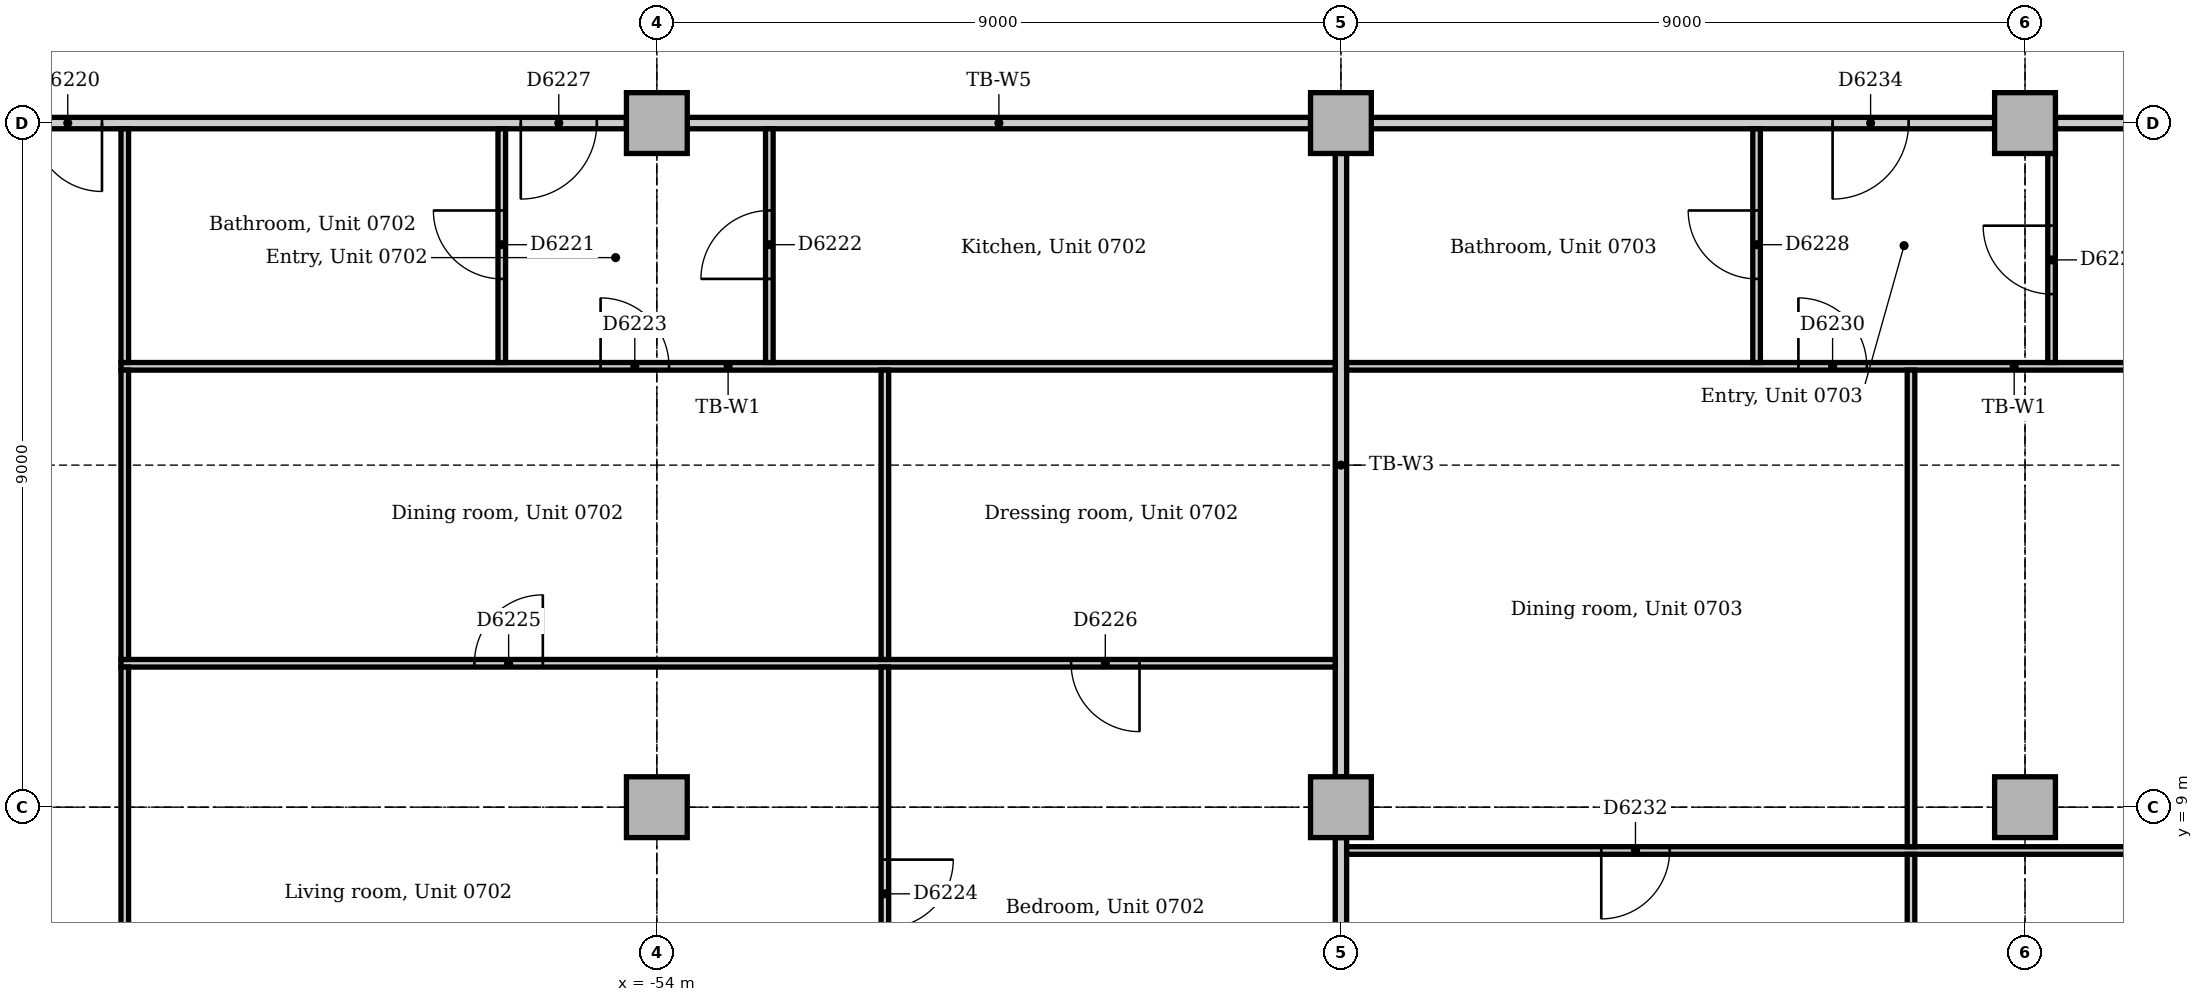
"""IFC4 building model, lengths in metres.
Left out: names, types, materials, properties, quantities, classifications, styles, units other than length and angle.
Written with IfcOpenShell. Run it as: python <this file> out.ifc"""

import sys

from ifc_helpers import new_model, si_unit, direction, frame, frame_2d, origin, origin_2d, place, context, subcontext, project, spatial, rectangle, extrude, element, fill, save


model = new_model("IFC4")
c1 = context("Model", 3, precision=1e-05, world=origin(), true_north=direction((0.0, 1.0)))
c2 = subcontext(c1, "Body", "Model", "MODEL_VIEW")
j1 = project(units=[si_unit("LENGTHUNIT", "METRE"), si_unit("PLANEANGLEUNIT", "RADIAN")], contexts=[c1])
p1 = place(None, origin())
s1 = spatial("IfcSite", under=j1, at=p1, CompositionType="ELEMENT")
p2 = place(p1, origin())
s2 = spatial("IfcBuilding", under=s1, at=p2, CompositionType="ELEMENT")
p3 = place(p2, frame((0.0, 0.0, 34.0)))
s3 = spatial("IfcBuildingStorey", under=s2, at=p3, CompositionType="ELEMENT", Elevation=34.0)
for number, where, z_axis, x_axis in (
    (1, (-54.0, 9.0, 0.0), (0.0, 0.0, 1.0), (1.0, 0.0, 0.0)),
    (2, (-54.0, 18.0, 0.0), (0.0, 0.0, 1.0), (1.0, 0.0, 0.0)),
    (3, (-45.0, 9.0, 0.0), (0.0, 0.0, 1.0), (1.0, 0.0, 0.0)),
    (4, (-45.0, 18.0, 0.0), (0.0, 0.0, 1.0), (1.0, 0.0, 0.0)),
    (5, (-36.0, 9.0, 0.0), (0.0, 0.0, 1.0), (1.0, 0.0, 0.0)),
    (6, (-36.0, 18.0, 0.0), (0.0, 0.0, 1.0), (1.0, 0.0, 0.0)),
):
    element("IfcColumn", number, at=place(p3, frame(where, z_axis=z_axis, x_axis=x_axis)), inside=s3, PredefinedType="COLUMN", context=c2, shape_type="SweptSolid", body=[
        extrude(rectangle(XDim=0.8, YDim=0.8, at=origin_2d()), origin(), (0.0, 0.0, 1.0), 3.85),
    ])
p4 = place(p3, frame((-35.6, 18.0, 0.0), z_axis=(0.0, 0.0, 1.0), x_axis=(1.0, 0.0, 0.0)))
e7 = element("IfcWall", 7, at=p4, inside=s3, PredefinedType="PARTITIONING", context=c2, shape_type="SweptSolid", body=[
    extrude(rectangle(XDim=7.25, YDim=0.15, at=frame_2d((3.625, 0.0))), origin(), (0.0, 0.0, 1.0), 3.15),
])
p5 = place(p3, frame((-44.6, 18.0, 0.0), z_axis=(0.0, 0.0, 1.0), x_axis=(1.0, 0.0, 0.0)))
e8 = element("IfcWall", 8, at=p5, inside=s3, PredefinedType="PARTITIONING", context=c2, shape_type="SweptSolid", body=[
    extrude(rectangle(XDim=8.2, YDim=0.15, at=frame_2d((4.1, 0.0))), origin(), (0.0, 0.0, 1.0), 3.15),
])
p6 = place(p5, frame((6.068, 0.0, 0.0)))
e9 = element("IfcOpeningElement", 9, at=p6, cuts=e8, PredefinedType="OPENING", context=c2, shape_type="SweptSolid", body=[
    extrude(rectangle(XDim=1.0, YDim=2.1, at=frame_2d((0.5, 1.05))), frame((0.0, 0.085, 0.0), z_axis=(0.0, -1.0, 0.0), x_axis=(1.0, 0.0, 0.0)), (0.0, 0.0, 1.0), 0.17),
])
p7 = place(p3, frame((-53.6, 18.0, 0.0), z_axis=(0.0, 0.0, 1.0), x_axis=(1.0, 0.0, 0.0)))
e10 = element("IfcWall", 10, at=p7, inside=s3, PredefinedType="PARTITIONING", context=c2, shape_type="SweptSolid", body=[
    extrude(rectangle(XDim=8.2, YDim=0.15, at=frame_2d((4.1, 0.0))), origin(), (0.0, 0.0, 1.0), 3.15),
])
p8 = place(p3, frame((-62.6, 18.0, 0.0), z_axis=(0.0, 0.0, 1.0), x_axis=(1.0, 0.0, 0.0)))
e11 = element("IfcWall", 11, at=p8, inside=s3, PredefinedType="PARTITIONING", context=c2, shape_type="SweptSolid", body=[
    extrude(rectangle(XDim=8.2, YDim=0.15, at=frame_2d((4.1, 0.0))), origin(), (0.0, 0.0, 1.0), 3.15),
])
p9 = place(p8, frame((0.4, 0.0, 0.0)))
e12 = element("IfcOpeningElement", 12, at=p9, cuts=e11, PredefinedType="OPENING", context=c2, shape_type="SweptSolid", body=[
    extrude(rectangle(XDim=0.9, YDim=2.1, at=frame_2d((0.45, 1.05))), frame((0.0, 0.085, 0.0), z_axis=(0.0, -1.0, 0.0), x_axis=(1.0, 0.0, 0.0)), (0.0, 0.0, 1.0), 0.17),
])
p10 = place(p8, frame((6.81, 0.0, 0.0)))
e13 = element("IfcOpeningElement", 13, at=p10, cuts=e11, PredefinedType="OPENING", context=c2, shape_type="SweptSolid", body=[
    extrude(rectangle(XDim=1.0, YDim=2.1, at=frame_2d((0.5, 1.05))), frame((0.0, 0.085, 0.0), z_axis=(0.0, -1.0, 0.0), x_axis=(1.0, 0.0, 0.0)), (0.0, 0.0, 1.0), 0.17),
])
p11 = place(p3, frame((-45.0, 9.4, 0.0), z_axis=(0.0, 0.0, 1.0), x_axis=(0.0, 1.0, 0.0)))
e14 = element("IfcWall", 14, at=p11, inside=s3, PredefinedType="PARTITIONING", context=c2, shape_type="SweptSolid", body=[
    extrude(rectangle(XDim=8.2, YDim=0.15, at=frame_2d((4.1, 0.0))), origin(), (0.0, 0.0, 1.0), 3.158),
])
p12 = place(p3, frame((-45.0, 5.85, 0.0), z_axis=(0.0, 0.0, 1.0), x_axis=(0.0, 1.0, 0.0)))
e15 = element("IfcWall", 15, at=p12, inside=s3, PredefinedType="PARTITIONING", context=c2, shape_type="SweptSolid", body=[
    extrude(rectangle(XDim=2.75, YDim=0.15, at=frame_2d((1.375, 0.0))), origin(), (0.0, 0.0, 1.0), 3.652),
])
p13 = place(p3, frame((-61.05, 14.8, 0.0), z_axis=(0.0, 0.0, 1.0), x_axis=(1.0, 0.0, 0.0)))
e16 = element("IfcWall", 16, at=p13, inside=s3, PredefinedType="PARTITIONING", context=c2, shape_type="SweptSolid", body=[
    extrude(rectangle(XDim=15.975, YDim=0.1, at=frame_2d((7.987, 0.0))), origin(), (0.0, 0.0, 1.0), 3.85),
])
p14 = place(p13, frame((6.31, 0.0, 0.0)))
e17 = element("IfcOpeningElement", 17, at=p14, cuts=e16, PredefinedType="OPENING", context=c2, shape_type="SweptSolid", body=[
    extrude(rectangle(XDim=0.9, YDim=2.1, at=frame_2d((0.45, 1.05))), frame((0.0, 0.06, 0.0), z_axis=(0.0, -1.0, 0.0), x_axis=(1.0, 0.0, 0.0)), (0.0, 0.0, 1.0), 0.12),
])
p15 = place(p3, frame((-44.925, 14.8, 0.0), z_axis=(0.0, 0.0, 1.0), x_axis=(1.0, 0.0, 0.0)))
e18 = element("IfcWall", 18, at=p15, inside=s3, PredefinedType="PARTITIONING", context=c2, shape_type="SweptSolid", body=[
    extrude(rectangle(XDim=17.565, YDim=0.1, at=frame_2d((8.783, 0.0))), origin(), (0.0, 0.0, 1.0), 3.85),
])
p16 = place(p15, frame((5.943, 0.0, 0.0)))
e19 = element("IfcOpeningElement", 19, at=p16, cuts=e18, PredefinedType="OPENING", context=c2, shape_type="SweptSolid", body=[
    extrude(rectangle(XDim=0.9, YDim=2.1, at=frame_2d((0.45, 1.05))), frame((0.0, 0.06, 0.0), z_axis=(0.0, -1.0, 0.0), x_axis=(1.0, 0.0, 0.0)), (0.0, 0.0, 1.0), 0.12),
])
p17 = place(p3, frame((-44.925, 8.43, 0.0), z_axis=(0.0, 0.0, 1.0), x_axis=(1.0, 0.0, 0.0)))
e20 = element("IfcWall", 20, at=p17, inside=s3, PredefinedType="PARTITIONING", context=c2, shape_type="SweptSolid", body=[
    extrude(rectangle(XDim=15.922, YDim=0.1, at=frame_2d((7.961, 0.0))), origin(), (0.0, 0.0, 1.0), 3.85),
])
p18 = place(p17, frame((3.35, 0.0, 0.0)))
e21 = element("IfcOpeningElement", 21, at=p18, cuts=e20, PredefinedType="OPENING", context=c2, shape_type="SweptSolid", body=[
    extrude(rectangle(XDim=0.9, YDim=2.1, at=frame_2d((0.45, 1.05))), frame((0.0, 0.06, 0.0), z_axis=(0.0, -1.0, 0.0), x_axis=(1.0, 0.0, 0.0)), (0.0, 0.0, 1.0), 0.12),
])
p19 = place(p17, frame((11.125, 0.0, 0.0)))
e22 = element("IfcOpeningElement", 22, at=p19, cuts=e20, PredefinedType="OPENING", context=c2, shape_type="SweptSolid", body=[
    extrude(rectangle(XDim=0.9, YDim=2.1, at=frame_2d((0.45, 1.05))), frame((0.0, 0.06, 0.0), z_axis=(0.0, -1.0, 0.0), x_axis=(1.0, 0.0, 0.0)), (0.0, 0.0, 1.0), 0.12),
])
p20 = place(p3, frame((-61.05, 10.893, 0.0), z_axis=(0.0, 0.0, 1.0), x_axis=(1.0, 0.0, 0.0)))
e23 = element("IfcWall", 23, at=p20, inside=s3, PredefinedType="PARTITIONING", context=c2, shape_type="SweptSolid", body=[
    extrude(rectangle(XDim=15.975, YDim=0.1, at=frame_2d((7.987, 0.0))), origin(), (0.0, 0.0, 1.0), 3.85),
])
p21 = place(p20, frame((4.65, 0.0, 0.0)))
e24 = element("IfcOpeningElement", 24, at=p21, cuts=e23, PredefinedType="OPENING", context=c2, shape_type="SweptSolid", body=[
    extrude(rectangle(XDim=0.9, YDim=2.1, at=frame_2d((0.45, 1.05))), frame((0.0, 0.06, 0.0), z_axis=(0.0, -1.0, 0.0), x_axis=(1.0, 0.0, 0.0)), (0.0, 0.0, 1.0), 0.12),
])
p22 = place(p20, frame((12.5, 0.0, 0.0)))
e25 = element("IfcOpeningElement", 25, at=p22, cuts=e23, PredefinedType="OPENING", context=c2, shape_type="SweptSolid", body=[
    extrude(rectangle(XDim=0.9, YDim=2.1, at=frame_2d((0.45, 1.05))), frame((0.0, 0.06, 0.0), z_axis=(0.0, -1.0, 0.0), x_axis=(1.0, 0.0, 0.0)), (0.0, 0.0, 1.0), 0.12),
])
p23 = place(p3, frame((-61.0, 14.85, 0.0), z_axis=(0.0, 0.0, 1.0), x_axis=(0.0, 1.0, 0.0)))
e26 = element("IfcWall", 26, at=p23, inside=s3, PredefinedType="PARTITIONING", context=c2, shape_type="SweptSolid", body=[
    extrude(rectangle(XDim=3.075, YDim=0.1, at=frame_2d((1.538, 0.0))), origin(), (0.0, 0.0, 1.0), 3.85),
])
p24 = place(p3, frame((-61.0, 10.943, 0.0), z_axis=(0.0, 0.0, 1.0), x_axis=(0.0, 1.0, 0.0)))
e27 = element("IfcWall", 27, at=p24, inside=s3, PredefinedType="PARTITIONING", context=c2, shape_type="SweptSolid", body=[
    extrude(rectangle(XDim=3.807, YDim=0.1, at=frame_2d((1.903, 0.0))), origin(), (0.0, 0.0, 1.0), 3.85),
])
p25 = place(p3, frame((-61.0, 4.86, 0.0), z_axis=(0.0, 0.0, 1.0), x_axis=(0.0, 1.0, 0.0)))
e28 = element("IfcWall", 28, at=p25, inside=s3, PredefinedType="PARTITIONING", context=c2, shape_type="SweptSolid", body=[
    extrude(rectangle(XDim=5.983, YDim=0.1, at=frame_2d((2.992, 0.0))), origin(), (0.0, 0.0, 1.0), 3.85),
])
p26 = place(p3, frame((-51.0, 10.943, 0.0), z_axis=(0.0, 0.0, 1.0), x_axis=(0.0, 1.0, 0.0)))
e29 = element("IfcWall", 29, at=p26, inside=s3, PredefinedType="PARTITIONING", context=c2, shape_type="SweptSolid", body=[
    extrude(rectangle(XDim=3.807, YDim=0.1, at=frame_2d((1.903, 0.0))), origin(), (0.0, 0.0, 1.0), 3.85),
])
p27 = place(p3, frame((-51.0, 4.86, 0.0), z_axis=(0.0, 0.0, 1.0), x_axis=(0.0, 1.0, 0.0)))
e30 = element("IfcWall", 30, at=p27, inside=s3, PredefinedType="PARTITIONING", context=c2, shape_type="SweptSolid", body=[
    extrude(rectangle(XDim=5.983, YDim=0.1, at=frame_2d((2.992, 0.0))), origin(), (0.0, 0.0, 1.0), 3.85),
])
p28 = place(p27, frame((2.55, 0.0, 0.0)))
e31 = element("IfcOpeningElement", 31, at=p28, cuts=e30, PredefinedType="OPENING", context=c2, shape_type="SweptSolid", body=[
    extrude(rectangle(XDim=0.9, YDim=2.1, at=frame_2d((0.45, 1.05))), frame((0.0, 0.06, 0.0), z_axis=(0.0, -1.0, 0.0), x_axis=(1.0, 0.0, 0.0)), (0.0, 0.0, 1.0), 0.12),
])
p29 = place(p3, frame((-37.5, 8.48, 0.0), z_axis=(0.0, 0.0, 1.0), x_axis=(0.0, 1.0, 0.0)))
e32 = element("IfcWall", 32, at=p29, inside=s3, PredefinedType="PARTITIONING", context=c2, shape_type="SweptSolid", body=[
    extrude(rectangle(XDim=6.27, YDim=0.1, at=frame_2d((3.135, 0.0))), origin(), (0.0, 0.0, 1.0), 3.85),
])
p30 = place(p3, frame((-37.5, 4.86, 0.0), z_axis=(0.0, 0.0, 1.0), x_axis=(0.0, 1.0, 0.0)))
e33 = element("IfcWall", 33, at=p30, inside=s3, PredefinedType="PARTITIONING", context=c2, shape_type="SweptSolid", body=[
    extrude(rectangle(XDim=3.52, YDim=0.1, at=frame_2d((1.76, 0.0))), origin(), (0.0, 0.0, 1.0), 3.85),
])
p31 = place(p30, frame((1.3, 0.0, 0.0)))
e34 = element("IfcOpeningElement", 34, at=p31, cuts=e33, PredefinedType="OPENING", context=c2, shape_type="SweptSolid", body=[
    extrude(rectangle(XDim=0.9, YDim=2.1, at=frame_2d((0.45, 1.05))), frame((0.0, 0.06, 0.0), z_axis=(0.0, -1.0, 0.0), x_axis=(1.0, 0.0, 0.0)), (0.0, 0.0, 1.0), 0.12),
])
p32 = place(p3, frame((-56.04, 14.85, 0.0), z_axis=(0.0, 0.0, 1.0), x_axis=(0.0, 1.0, 0.0)))
e35 = element("IfcWall", 35, at=p32, inside=s3, PredefinedType="PARTITIONING", context=c2, shape_type="SweptSolid", body=[
    extrude(rectangle(XDim=3.075, YDim=0.1, at=frame_2d((1.538, 0.0))), origin(), (0.0, 0.0, 1.0), 3.85),
])
p33 = place(p32, frame((1.1, 0.0, 0.0)))
e36 = element("IfcOpeningElement", 36, at=p33, cuts=e35, PredefinedType="OPENING", context=c2, shape_type="SweptSolid", body=[
    extrude(rectangle(XDim=0.9, YDim=2.1, at=frame_2d((0.45, 1.05))), frame((0.0, 0.06, 0.0), z_axis=(0.0, -1.0, 0.0), x_axis=(1.0, 0.0, 0.0)), (0.0, 0.0, 1.0), 0.12),
])
p34 = place(p3, frame((-52.52, 14.85, 0.0), z_axis=(0.0, 0.0, 1.0), x_axis=(0.0, 1.0, 0.0)))
e37 = element("IfcWall", 37, at=p34, inside=s3, PredefinedType="PARTITIONING", context=c2, shape_type="SweptSolid", body=[
    extrude(rectangle(XDim=3.075, YDim=0.1, at=frame_2d((1.538, 0.0))), origin(), (0.0, 0.0, 1.0), 3.85),
])
p35 = place(p34, frame((1.1, 0.0, 0.0)))
e38 = element("IfcOpeningElement", 38, at=p35, cuts=e37, PredefinedType="OPENING", context=c2, shape_type="SweptSolid", body=[
    extrude(rectangle(XDim=0.9, YDim=2.1, at=frame_2d((0.45, 1.05))), frame((0.0, 0.06, 0.0), z_axis=(0.0, -1.0, 0.0), x_axis=(1.0, 0.0, 0.0)), (0.0, 0.0, 1.0), 0.12),
])
p36 = place(p3, frame((-39.532, 14.85, 0.0), z_axis=(0.0, 0.0, 1.0), x_axis=(0.0, 1.0, 0.0)))
e39 = element("IfcWall", 39, at=p36, inside=s3, PredefinedType="PARTITIONING", context=c2, shape_type="SweptSolid", body=[
    extrude(rectangle(XDim=3.075, YDim=0.1, at=frame_2d((1.538, 0.0))), origin(), (0.0, 0.0, 1.0), 3.85),
])
p37 = place(p36, frame((1.1, 0.0, 0.0)))
e40 = element("IfcOpeningElement", 40, at=p37, cuts=e39, PredefinedType="OPENING", context=c2, shape_type="SweptSolid", body=[
    extrude(rectangle(XDim=0.9, YDim=2.1, at=frame_2d((0.45, 1.05))), frame((0.0, 0.06, 0.0), z_axis=(0.0, -1.0, 0.0), x_axis=(1.0, 0.0, 0.0)), (0.0, 0.0, 1.0), 0.12),
])
p38 = place(p3, frame((-35.651, 14.85, 0.0), z_axis=(0.0, 0.0, 1.0), x_axis=(0.0, 1.0, 0.0)))
e41 = element("IfcWall", 41, at=p38, inside=s3, PredefinedType="PARTITIONING", context=c2, shape_type="SweptSolid", body=[
    extrude(rectangle(XDim=2.75, YDim=0.1, at=frame_2d((1.375, 0.0))), origin(), (0.0, 0.0, 1.0), 3.85),
])
p39 = place(p38, frame((0.9, 0.0, 0.0)))
e42 = element("IfcOpeningElement", 42, at=p39, cuts=e41, PredefinedType="OPENING", context=c2, shape_type="SweptSolid", body=[
    extrude(rectangle(XDim=0.9, YDim=2.1, at=frame_2d((0.45, 1.05))), frame((0.0, 0.06, 0.0), z_axis=(0.0, -1.0, 0.0), x_axis=(1.0, 0.0, 0.0)), (0.0, 0.0, 1.0), 0.12),
])
p40 = place(p9, frame((0.9, 0.0, 0.0), z_axis=(0.0, 0.0, 1.0), x_axis=(-1.0, 0.0, 0.0)))
e43 = element("IfcDoor", 43, at=p40, inside=s3, OperationType="SINGLE_SWING_LEFT", PredefinedType="DOOR", context=c2, shape_type="SweptSolid", body=[
    extrude(rectangle(XDim=0.9, YDim=2.1, at=frame_2d((0.45, 1.05))), frame((0.0, 0.025, 0.0), z_axis=(0.0, -1.0, 0.0), x_axis=(1.0, 0.0, 0.0)), (0.0, 0.0, 1.0), 0.05),
])
fill(e12, e43)
p41 = place(p33, origin())
e44 = element("IfcDoor", 44, at=p41, inside=s3, OperationType="SINGLE_SWING_RIGHT", PredefinedType="DOOR", context=c2, shape_type="SweptSolid", body=[
    extrude(rectangle(XDim=0.9, YDim=2.1, at=frame_2d((0.45, 1.05))), frame((0.0, 0.025, 0.0), z_axis=(0.0, -1.0, 0.0), x_axis=(1.0, 0.0, 0.0)), (0.0, 0.0, 1.0), 0.05),
])
fill(e36, e44)
p42 = place(p35, origin())
e45 = element("IfcDoor", 45, at=p42, inside=s3, OperationType="SINGLE_SWING_LEFT", PredefinedType="DOOR", context=c2, shape_type="SweptSolid", body=[
    extrude(rectangle(XDim=0.9, YDim=2.1, at=frame_2d((0.45, 1.05))), frame((0.0, 0.025, 0.0), z_axis=(0.0, -1.0, 0.0), x_axis=(1.0, 0.0, 0.0)), (0.0, 0.0, 1.0), 0.05),
])
fill(e38, e45)
p43 = place(p14, origin())
e46 = element("IfcDoor", 46, at=p43, inside=s3, OperationType="SINGLE_SWING_LEFT", PredefinedType="DOOR", context=c2, shape_type="SweptSolid", body=[
    extrude(rectangle(XDim=0.9, YDim=2.1, at=frame_2d((0.45, 1.05))), frame((0.0, 0.025, 0.0), z_axis=(0.0, -1.0, 0.0), x_axis=(1.0, 0.0, 0.0)), (0.0, 0.0, 1.0), 0.05),
])
fill(e17, e46)
p44 = place(p28, frame((0.9, 0.0, 0.0), z_axis=(0.0, 0.0, 1.0), x_axis=(-1.0, 0.0, 0.0)))
e47 = element("IfcDoor", 47, at=p44, inside=s3, OperationType="SINGLE_SWING_LEFT", PredefinedType="DOOR", context=c2, shape_type="SweptSolid", body=[
    extrude(rectangle(XDim=0.9, YDim=2.1, at=frame_2d((0.45, 1.05))), frame((0.0, 0.025, 0.0), z_axis=(0.0, -1.0, 0.0), x_axis=(1.0, 0.0, 0.0)), (0.0, 0.0, 1.0), 0.05),
])
fill(e31, e47)
p45 = place(p21, origin())
e48 = element("IfcDoor", 48, at=p45, inside=s3, OperationType="SINGLE_SWING_RIGHT", PredefinedType="DOOR", context=c2, shape_type="SweptSolid", body=[
    extrude(rectangle(XDim=0.9, YDim=2.1, at=frame_2d((0.45, 1.05))), frame((0.0, 0.025, 0.0), z_axis=(0.0, -1.0, 0.0), x_axis=(1.0, 0.0, 0.0)), (0.0, 0.0, 1.0), 0.05),
])
fill(e24, e48)
p46 = place(p22, frame((0.9, 0.0, 0.0), z_axis=(0.0, 0.0, 1.0), x_axis=(-1.0, 0.0, 0.0)))
e49 = element("IfcDoor", 49, at=p46, inside=s3, OperationType="SINGLE_SWING_LEFT", PredefinedType="DOOR", context=c2, shape_type="SweptSolid", body=[
    extrude(rectangle(XDim=0.9, YDim=2.1, at=frame_2d((0.45, 1.05))), frame((0.0, 0.025, 0.0), z_axis=(0.0, -1.0, 0.0), x_axis=(1.0, 0.0, 0.0)), (0.0, 0.0, 1.0), 0.05),
])
fill(e25, e49)
p47 = place(p10, frame((1.0, 0.0, 0.0), z_axis=(0.0, 0.0, 1.0), x_axis=(-1.0, 0.0, 0.0)))
e50 = element("IfcDoor", 50, at=p47, inside=s3, OperationType="SINGLE_SWING_RIGHT", PredefinedType="DOOR", context=c2, shape_type="SweptSolid", body=[
    extrude(rectangle(XDim=1.0, YDim=2.1, at=frame_2d((0.5, 1.05))), frame((0.0, 0.025, 0.0), z_axis=(0.0, -1.0, 0.0), x_axis=(1.0, 0.0, 0.0)), (0.0, 0.0, 1.0), 0.05),
])
fill(e13, e50)
p48 = place(p37, origin())
e51 = element("IfcDoor", 51, at=p48, inside=s3, OperationType="SINGLE_SWING_RIGHT", PredefinedType="DOOR", context=c2, shape_type="SweptSolid", body=[
    extrude(rectangle(XDim=0.9, YDim=2.1, at=frame_2d((0.45, 1.05))), frame((0.0, 0.025, 0.0), z_axis=(0.0, -1.0, 0.0), x_axis=(1.0, 0.0, 0.0)), (0.0, 0.0, 1.0), 0.05),
])
fill(e40, e51)
p49 = place(p39, origin())
e52 = element("IfcDoor", 52, at=p49, inside=s3, OperationType="SINGLE_SWING_RIGHT", PredefinedType="DOOR", context=c2, shape_type="SweptSolid", body=[
    extrude(rectangle(XDim=0.9, YDim=2.1, at=frame_2d((0.45, 1.05))), frame((0.0, 0.025, 0.0), z_axis=(0.0, -1.0, 0.0), x_axis=(1.0, 0.0, 0.0)), (0.0, 0.0, 1.0), 0.05),
])
fill(e42, e52)
p50 = place(p16, origin())
e53 = element("IfcDoor", 53, at=p50, inside=s3, OperationType="SINGLE_SWING_LEFT", PredefinedType="DOOR", context=c2, shape_type="SweptSolid", body=[
    extrude(rectangle(XDim=0.9, YDim=2.1, at=frame_2d((0.45, 1.05))), frame((0.0, 0.025, 0.0), z_axis=(0.0, -1.0, 0.0), x_axis=(1.0, 0.0, 0.0)), (0.0, 0.0, 1.0), 0.05),
])
fill(e19, e53)
p51 = place(p18, frame((0.9, 0.0, 0.0), z_axis=(0.0, 0.0, 1.0), x_axis=(-1.0, 0.0, 0.0)))
e54 = element("IfcDoor", 54, at=p51, inside=s3, OperationType="SINGLE_SWING_RIGHT", PredefinedType="DOOR", context=c2, shape_type="SweptSolid", body=[
    extrude(rectangle(XDim=0.9, YDim=2.1, at=frame_2d((0.45, 1.05))), frame((0.0, 0.025, 0.0), z_axis=(0.0, -1.0, 0.0), x_axis=(1.0, 0.0, 0.0)), (0.0, 0.0, 1.0), 0.05),
])
fill(e21, e54)
p52 = place(p6, frame((1.0, 0.0, 0.0), z_axis=(0.0, 0.0, 1.0), x_axis=(-1.0, 0.0, 0.0)))
e55 = element("IfcDoor", 55, at=p52, inside=s3, OperationType="SINGLE_SWING_RIGHT", PredefinedType="DOOR", context=c2, shape_type="SweptSolid", body=[
    extrude(rectangle(XDim=1.0, YDim=2.1, at=frame_2d((0.5, 1.05))), frame((0.0, 0.025, 0.0), z_axis=(0.0, -1.0, 0.0), x_axis=(1.0, 0.0, 0.0)), (0.0, 0.0, 1.0), 0.05),
])
fill(e9, e55)
save(model, sys.argv[1])
